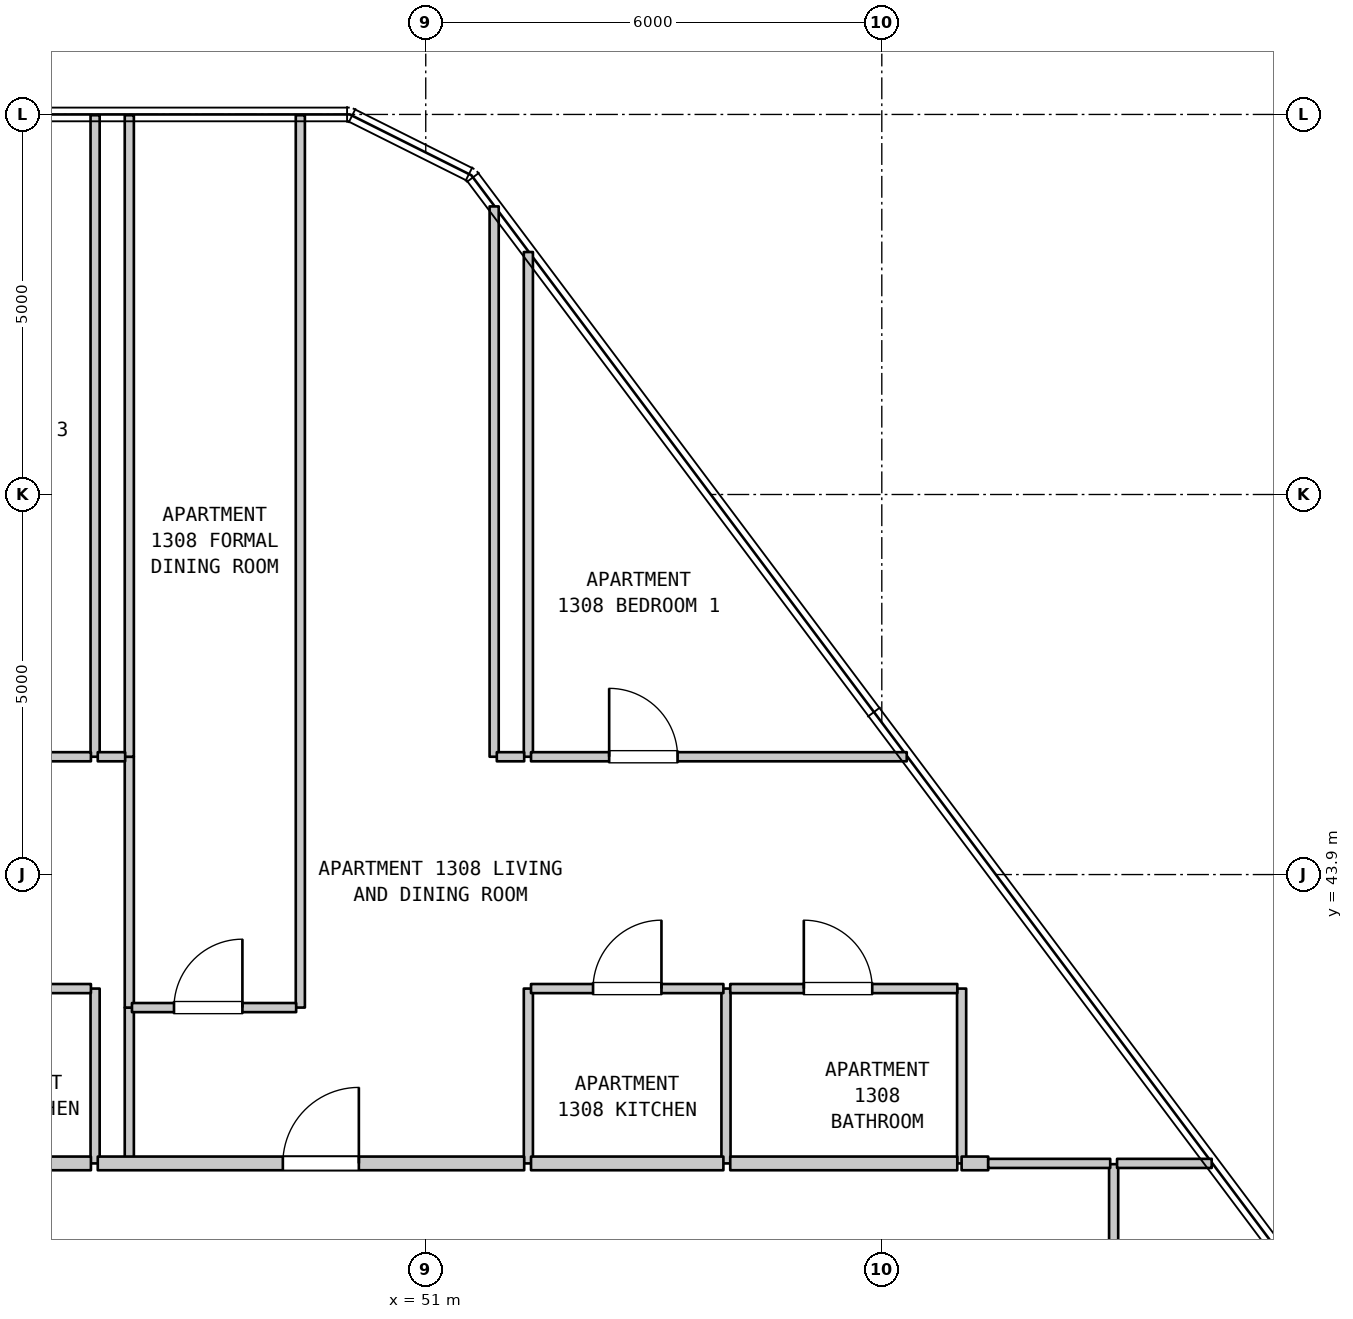
"""IFC4 building model, lengths in metres.
Left out: names, types, materials, properties, quantities, classifications, styles, units other than length and angle.
Written with IfcOpenShell. Run it as: python <this file> out.ifc"""

import sys

from ifc_helpers import new_model, si_unit, direction, frame, frame_2d, origin, place, context, subcontext, project, spatial, rectangle, extrude, element, fill, save


model = new_model("IFC4")
c1 = context("Model", 3, precision=1e-05, world=origin(), true_north=direction((0.0, 1.0)))
c2 = subcontext(c1, "Body", "Model", "MODEL_VIEW")
j1 = project(units=[si_unit("LENGTHUNIT", "METRE"), si_unit("PLANEANGLEUNIT", "RADIAN")], contexts=[c1])
p1 = place(None, origin())
s1 = spatial("IfcSite", under=j1, at=p1, CompositionType="ELEMENT")
p2 = place(p1, origin())
s2 = spatial("IfcBuilding", under=s1, at=p2, CompositionType="ELEMENT")
p3 = place(p2, frame((0.0, 0.0, 57.3)))
s3 = spatial("IfcBuildingStorey", under=s2, at=p3, CompositionType="ELEMENT", Elevation=57.3)
p4 = place(p3, frame((46.65, 40.1, 0.0), z_axis=(0.0, 0.0, 1.0), x_axis=(0.0, 1.0, 0.0)))
e1 = element("IfcWall", 1, at=p4, inside=s3, PredefinedType="PARTITIONING", context=c2, shape_type="SweptSolid", body=[
    extrude(rectangle(XDim=2.3, YDim=0.12, at=frame_2d((1.15, 0.0))), origin(), (0.0, 0.0, 1.0), 3.28),
])
p5 = place(p3, frame((46.65, 45.45, 0.0), z_axis=(0.0, 0.0, 1.0), x_axis=(0.0, 1.0, 0.0)))
e2 = element("IfcWall", 2, at=p5, inside=s3, PredefinedType="PARTITIONING", context=c2, shape_type="SweptSolid", body=[
    extrude(rectangle(XDim=8.44, YDim=0.12, at=frame_2d((4.22, 0.0))), origin(), (0.0, 0.0, 1.0), 3.28),
])
p6 = place(p3, frame((47.1, 40.1, 0.0), z_axis=(0.0, 0.0, 1.0), x_axis=(0.0, 1.0, 0.0)))
e3 = element("IfcWall", 3, at=p6, inside=s3, PredefinedType="PARTITIONING", context=c2, shape_type="SweptSolid", body=[
    extrude(rectangle(XDim=2.05, YDim=0.12, at=frame_2d((1.025, 0.0))), origin(), (0.0, 0.0, 1.0), 3.28),
])
p7 = place(p3, frame((47.1, 42.15, 0.0), z_axis=(0.0, 0.0, 1.0), x_axis=(0.0, 1.0, 0.0)))
e4 = element("IfcWall", 4, at=p7, inside=s3, PredefinedType="PARTITIONING", context=c2, shape_type="SweptSolid", body=[
    extrude(rectangle(XDim=3.3, YDim=0.12, at=frame_2d((1.65, 0.0))), origin(), (0.0, 0.0, 1.0), 3.28),
])
p8 = place(p3, frame((47.1, 45.45, 0.0), z_axis=(0.0, 0.0, 1.0), x_axis=(0.0, 1.0, 0.0)))
e5 = element("IfcWall", 5, at=p8, inside=s3, PredefinedType="PARTITIONING", context=c2, shape_type="SweptSolid", body=[
    extrude(rectangle(XDim=8.44, YDim=0.12, at=frame_2d((4.22, 0.0))), origin(), (0.0, 0.0, 1.0), 3.28),
])
p9 = place(p3, frame((49.35, 42.15, 0.0), z_axis=(0.0, 0.0, 1.0), x_axis=(0.0, 1.0, 0.0)))
e6 = element("IfcWall", 6, at=p9, inside=s3, PredefinedType="PARTITIONING", context=c2, shape_type="SweptSolid", body=[
    extrude(rectangle(XDim=11.74, YDim=0.12, at=frame_2d((5.87, 0.0))), origin(), (0.0, 0.0, 1.0), 3.28),
])
p10 = place(p3, frame((51.9, 45.45, 0.0), z_axis=(0.0, 0.0, 1.0), x_axis=(0.0, 1.0, 0.0)))
e7 = element("IfcWall", 7, at=p10, inside=s3, PredefinedType="PARTITIONING", context=c2, shape_type="SweptSolid", body=[
    extrude(rectangle(XDim=7.24, YDim=0.12, at=frame_2d((3.62, 0.0))), origin(), (0.0, 0.0, 1.0), 3.28),
])
p11 = place(p3, frame((52.35, 40.1, 0.0), z_axis=(0.0, 0.0, 1.0), x_axis=(0.0, 1.0, 0.0)))
e8 = element("IfcWall", 8, at=p11, inside=s3, PredefinedType="PARTITIONING", context=c2, shape_type="SweptSolid", body=[
    extrude(rectangle(XDim=2.3, YDim=0.12, at=frame_2d((1.15, 0.0))), origin(), (0.0, 0.0, 1.0), 3.28),
])
p12 = place(p3, frame((52.35, 45.45, 0.0), z_axis=(0.0, 0.0, 1.0), x_axis=(0.0, 1.0, 0.0)))
e9 = element("IfcWall", 9, at=p12, inside=s3, PredefinedType="PARTITIONING", context=c2, shape_type="SweptSolid", body=[
    extrude(rectangle(XDim=6.64, YDim=0.12, at=frame_2d((3.32, 0.0))), origin(), (0.0, 0.0, 1.0), 3.28),
])
for number, where, z_axis, x_axis in (
    (10, (54.95, 40.1, 0.0), (0.0, 0.0, 1.0), (0.0, 1.0, 0.0)),
    (11, (58.05, 40.1, 0.0), (0.0, 0.0, 1.0), (0.0, 1.0, 0.0)),
):
    element("IfcWall", number, at=place(p3, frame(where, z_axis=z_axis, x_axis=x_axis)), inside=s3, PredefinedType="PARTITIONING", context=c2, shape_type="SweptSolid", body=[
        extrude(rectangle(XDim=2.3, YDim=0.12, at=frame_2d((1.15, 0.0))), origin(), (0.0, 0.0, 1.0), 3.28),
    ])
p13 = place(p3, frame((60.05, 37.89, 0.0), z_axis=(0.0, 0.0, 1.0), x_axis=(0.0, 1.0, 0.0)))
e12 = element("IfcWall", 12, at=p13, inside=s3, PredefinedType="PARTITIONING", context=c2, shape_type="SweptSolid", body=[
    extrude(rectangle(XDim=2.2, YDim=0.12, at=frame_2d((1.1, 0.0))), origin(), (0.0, 0.0, 1.0), 3.28),
])
p14 = place(p3, frame((43.525, 40.1, 0.0), z_axis=(0.0, 0.0, 1.0), x_axis=(1.0, 0.0, 0.0)))
e13 = element("IfcWall", 13, at=p14, inside=s3, PredefinedType="STANDARD", context=c2, shape_type="SweptSolid", body=[
    extrude(rectangle(XDim=3.07, YDim=0.18, at=frame_2d((1.535, 0.0))), origin(), (0.0, 0.0, 1.0), 3.28),
])
p15 = place(p3, frame((46.685, 40.1, 0.0), z_axis=(0.0, 0.0, 1.0), x_axis=(1.0, 0.0, 0.0)))
e14 = element("IfcWall", 14, at=p15, inside=s3, PredefinedType="STANDARD", context=c2, shape_type="SweptSolid", body=[
    extrude(rectangle(XDim=5.61, YDim=0.18, at=frame_2d((2.805, 0.0))), origin(), (0.0, 0.0, 1.0), 3.28),
])
p16 = place(p15, frame((2.435, 0.0, 0.0)))
e15 = element("IfcOpeningElement", 15, at=p16, cuts=e14, PredefinedType="OPENING", context=c2, shape_type="SweptSolid", body=[
    extrude(rectangle(XDim=1.0, YDim=2.15, at=frame_2d((0.5, 1.075))), frame((0.0, 0.1, 0.0), z_axis=(0.0, -1.0, 0.0), x_axis=(1.0, 0.0, 0.0)), (0.0, 0.0, 1.0), 0.2),
])
p17 = place(p3, frame((52.385, 40.1, 0.0), z_axis=(0.0, 0.0, 1.0), x_axis=(1.0, 0.0, 0.0)))
e16 = element("IfcWall", 16, at=p17, inside=s3, PredefinedType="STANDARD", context=c2, shape_type="SweptSolid", body=[
    extrude(rectangle(XDim=2.531, YDim=0.18, at=frame_2d((1.266, 0.0))), origin(), (0.0, 0.0, 1.0), 3.28),
])
p18 = place(p3, frame((55.006, 40.1, 0.0), z_axis=(0.0, 0.0, 1.0), x_axis=(1.0, 0.0, 0.0)))
e17 = element("IfcWall", 17, at=p18, inside=s3, PredefinedType="STANDARD", context=c2, shape_type="SweptSolid", body=[
    extrude(rectangle(XDim=2.987, YDim=0.18, at=frame_2d((1.493, 0.0))), origin(), (0.0, 0.0, 1.0), 3.28),
])
p19 = place(p3, frame((58.05, 40.1, 0.0), z_axis=(0.0, 0.0, 1.0), x_axis=(1.0, 0.0, 0.0)))
e18 = element("IfcWall", 18, at=p19, inside=s3, PredefinedType="STANDARD", context=c2, shape_type="SweptSolid", body=[
    extrude(rectangle(XDim=0.35, YDim=0.18, at=frame_2d((0.175, 0.0))), origin(), (0.0, 0.0, 1.0), 3.28),
])
p20 = place(p3, frame((58.4, 40.1, 0.0), z_axis=(0.0, 0.0, 1.0), x_axis=(1.0, 0.0, 0.0)))
e19 = element("IfcWall", 19, at=p20, inside=s3, PredefinedType="PARTITIONING", context=c2, shape_type="SweptSolid", body=[
    extrude(rectangle(XDim=1.605, YDim=0.12, at=frame_2d((0.802, 0.0))), origin(), (0.0, 0.0, 1.0), 3.28),
])
p21 = place(p3, frame((60.095, 40.1, 0.0), z_axis=(0.0, 0.0, 1.0), x_axis=(1.0, 0.0, 0.0)))
e20 = element("IfcWall", 20, at=p21, inside=s3, PredefinedType="PARTITIONING", context=c2, shape_type="SweptSolid", body=[
    extrude(rectangle(XDim=1.245, YDim=0.12, at=frame_2d((0.623, 0.0))), origin(), (0.0, 0.0, 1.0), 3.28),
])
p22 = place(p3, frame((47.135, 42.15, 0.0), z_axis=(0.0, 0.0, 1.0), x_axis=(1.0, 0.0, 0.0)))
e21 = element("IfcWall", 21, at=p22, inside=s3, PredefinedType="PARTITIONING", context=c2, shape_type="SweptSolid", body=[
    extrude(rectangle(XDim=2.16, YDim=0.12, at=frame_2d((1.08, 0.0))), origin(), (0.0, 0.0, 1.0), 3.28),
])
p23 = place(p22, frame((0.553, 0.0, 0.0)))
e22 = element("IfcOpeningElement", 22, at=p23, cuts=e21, PredefinedType="OPENING", context=c2, shape_type="SweptSolid", body=[
    extrude(rectangle(XDim=0.9, YDim=2.15, at=frame_2d((0.45, 1.075))), frame((0.0, 0.07, 0.0), z_axis=(0.0, -1.0, 0.0), x_axis=(1.0, 0.0, 0.0)), (0.0, 0.0, 1.0), 0.14),
])
p24 = place(p3, frame((43.525, 42.4, 0.0), z_axis=(0.0, 0.0, 1.0), x_axis=(1.0, 0.0, 0.0)))
e23 = element("IfcWall", 23, at=p24, inside=s3, PredefinedType="PARTITIONING", context=c2, shape_type="SweptSolid", body=[
    extrude(rectangle(XDim=3.07, YDim=0.12, at=frame_2d((1.535, 0.0))), origin(), (0.0, 0.0, 1.0), 3.28),
])
p25 = place(p24, frame((1.085, 0.0, 0.0)))
e24 = element("IfcOpeningElement", 24, at=p25, cuts=e23, PredefinedType="OPENING", context=c2, shape_type="SweptSolid", body=[
    extrude(rectangle(XDim=0.9, YDim=2.15, at=frame_2d((0.45, 1.075))), frame((0.0, 0.07, 0.0), z_axis=(0.0, -1.0, 0.0), x_axis=(1.0, 0.0, 0.0)), (0.0, 0.0, 1.0), 0.14),
])
p26 = place(p3, frame((52.385, 42.4, 0.0), z_axis=(0.0, 0.0, 1.0), x_axis=(1.0, 0.0, 0.0)))
e25 = element("IfcWall", 25, at=p26, inside=s3, PredefinedType="PARTITIONING", context=c2, shape_type="SweptSolid", body=[
    extrude(rectangle(XDim=2.531, YDim=0.12, at=frame_2d((1.266, 0.0))), origin(), (0.0, 0.0, 1.0), 3.28),
])
p27 = place(p26, frame((0.816, 0.0, 0.0)))
e26 = element("IfcOpeningElement", 26, at=p27, cuts=e25, PredefinedType="OPENING", context=c2, shape_type="SweptSolid", body=[
    extrude(rectangle(XDim=0.9, YDim=2.15, at=frame_2d((0.45, 1.075))), frame((0.0, 0.07, 0.0), z_axis=(0.0, -1.0, 0.0), x_axis=(1.0, 0.0, 0.0)), (0.0, 0.0, 1.0), 0.14),
])
p28 = place(p3, frame((55.006, 42.4, 0.0), z_axis=(0.0, 0.0, 1.0), x_axis=(1.0, 0.0, 0.0)))
e27 = element("IfcWall", 27, at=p28, inside=s3, PredefinedType="PARTITIONING", context=c2, shape_type="SweptSolid", body=[
    extrude(rectangle(XDim=2.987, YDim=0.12, at=frame_2d((1.493, 0.0))), origin(), (0.0, 0.0, 1.0), 3.28),
])
p29 = place(p28, frame((0.968, 0.0, 0.0)))
e28 = element("IfcOpeningElement", 28, at=p29, cuts=e27, PredefinedType="OPENING", context=c2, shape_type="SweptSolid", body=[
    extrude(rectangle(XDim=0.9, YDim=2.1, at=frame_2d((0.45, 1.05))), frame((0.0, 0.07, 0.0), z_axis=(0.0, -1.0, 0.0), x_axis=(1.0, 0.0, 0.0)), (0.0, 0.0, 1.0), 0.14),
])
p30 = place(p3, frame((38.235, 45.45, 0.0), z_axis=(0.0, 0.0, 1.0), x_axis=(1.0, 0.0, 0.0)))
e29 = element("IfcWall", 29, at=p30, inside=s3, PredefinedType="PARTITIONING", context=c2, shape_type="SweptSolid", body=[
    extrude(rectangle(XDim=8.36, YDim=0.12, at=frame_2d((4.18, 0.0))), origin(), (0.0, 0.0, 1.0), 3.28),
])
p31 = place(p30, frame((1.014, 0.0, 0.0)))
e30 = element("IfcOpeningElement", 30, at=p31, cuts=e29, PredefinedType="OPENING", context=c2, shape_type="SweptSolid", body=[
    extrude(rectangle(XDim=0.9, YDim=2.15, at=frame_2d((0.45, 1.075))), frame((0.0, 0.07, 0.0), z_axis=(0.0, -1.0, 0.0), x_axis=(1.0, 0.0, 0.0)), (0.0, 0.0, 1.0), 0.14),
])
p32 = place(p30, frame((3.73, 0.0, 0.0)))
e31 = element("IfcOpeningElement", 31, at=p32, cuts=e29, PredefinedType="OPENING", context=c2, shape_type="SweptSolid", body=[
    extrude(rectangle(XDim=0.9, YDim=2.15, at=frame_2d((0.45, 1.075))), frame((0.0, 0.07, 0.0), z_axis=(0.0, -1.0, 0.0), x_axis=(1.0, 0.0, 0.0)), (0.0, 0.0, 1.0), 0.14),
])
p33 = place(p30, frame((6.297, 0.0, 0.0)))
e32 = element("IfcOpeningElement", 32, at=p33, cuts=e29, PredefinedType="OPENING", context=c2, shape_type="SweptSolid", body=[
    extrude(rectangle(XDim=0.9, YDim=2.15, at=frame_2d((0.45, 1.075))), frame((0.0, 0.07, 0.0), z_axis=(0.0, -1.0, 0.0), x_axis=(1.0, 0.0, 0.0)), (0.0, 0.0, 1.0), 0.14),
])
for number, where, z_axis, x_axis in (
    (33, (46.685, 45.45, 0.0), (0.0, 0.0, 1.0), (1.0, 0.0, 0.0)),
    (34, (51.935, 45.45, 0.0), (0.0, 0.0, 1.0), (1.0, 0.0, 0.0)),
):
    element("IfcWall", number, at=place(p3, frame(where, z_axis=z_axis, x_axis=x_axis)), inside=s3, PredefinedType="PARTITIONING", context=c2, shape_type="SweptSolid", body=[
        extrude(rectangle(XDim=0.36, YDim=0.12, at=frame_2d((0.18, 0.0))), origin(), (0.0, 0.0, 1.0), 3.28),
    ])
p34 = place(p3, frame((52.385, 45.45, 0.0), z_axis=(0.0, 0.0, 1.0), x_axis=(1.0, 0.0, 0.0)))
e35 = element("IfcWall", 35, at=p34, inside=s3, PredefinedType="PARTITIONING", context=c2, shape_type="SweptSolid", body=[
    extrude(rectangle(XDim=4.943, YDim=0.12, at=frame_2d((2.471, 0.0))), origin(), (0.0, 0.0, 1.0), 3.28),
])
p35 = place(p34, frame((1.028, 0.0, 0.0)))
e36 = element("IfcOpeningElement", 36, at=p35, cuts=e35, PredefinedType="OPENING", context=c2, shape_type="SweptSolid", body=[
    extrude(rectangle(XDim=0.9, YDim=2.15, at=frame_2d((0.45, 1.075))), frame((0.0, 0.07, 0.0), z_axis=(0.0, -1.0, 0.0), x_axis=(1.0, 0.0, 0.0)), (0.0, 0.0, 1.0), 0.14),
])
p36 = place(p16, origin())
e37 = element("IfcDoor", 37, at=p36, inside=s3, OperationType="SINGLE_SWING_RIGHT", PredefinedType="DOOR", context=c2, shape_type="SweptSolid", body=[
    extrude(rectangle(XDim=1.0, YDim=2.15, at=frame_2d((0.5, 1.075))), frame((0.0, 0.025, 0.0), z_axis=(0.0, -1.0, 0.0), x_axis=(1.0, 0.0, 0.0)), (0.0, 0.0, 1.0), 0.05),
])
fill(e15, e37)
p37 = place(p23, origin())
e38 = element("IfcDoor", 38, at=p37, inside=s3, OperationType="SINGLE_SWING_RIGHT", PredefinedType="DOOR", context=c2, shape_type="SweptSolid", body=[
    extrude(rectangle(XDim=0.9, YDim=2.15, at=frame_2d((0.45, 1.075))), frame((0.0, 0.025, 0.0), z_axis=(0.0, -1.0, 0.0), x_axis=(1.0, 0.0, 0.0)), (0.0, 0.0, 1.0), 0.05),
])
fill(e22, e38)
p38 = place(p27, origin())
e39 = element("IfcDoor", 39, at=p38, inside=s3, OperationType="SINGLE_SWING_RIGHT", PredefinedType="DOOR", context=c2, shape_type="SweptSolid", body=[
    extrude(rectangle(XDim=0.9, YDim=2.15, at=frame_2d((0.45, 1.075))), frame((0.0, 0.025, 0.0), z_axis=(0.0, -1.0, 0.0), x_axis=(1.0, 0.0, 0.0)), (0.0, 0.0, 1.0), 0.05),
])
fill(e26, e39)
p39 = place(p29, origin())
e40 = element("IfcDoor", 40, at=p39, inside=s3, OperationType="SINGLE_SWING_LEFT", PredefinedType="DOOR", context=c2, shape_type="SweptSolid", body=[
    extrude(rectangle(XDim=0.9, YDim=2.1, at=frame_2d((0.45, 1.05))), frame((0.0, 0.025, 0.0), z_axis=(0.0, -1.0, 0.0), x_axis=(1.0, 0.0, 0.0)), (0.0, 0.0, 1.0), 0.05),
])
fill(e28, e40)
p40 = place(p35, origin())
e41 = element("IfcDoor", 41, at=p40, inside=s3, OperationType="SINGLE_SWING_LEFT", PredefinedType="DOOR", context=c2, shape_type="SweptSolid", body=[
    extrude(rectangle(XDim=0.9, YDim=2.15, at=frame_2d((0.45, 1.075))), frame((0.0, 0.025, 0.0), z_axis=(0.0, -1.0, 0.0), x_axis=(1.0, 0.0, 0.0)), (0.0, 0.0, 1.0), 0.05),
])
fill(e36, e41)
save(model, sys.argv[1])
